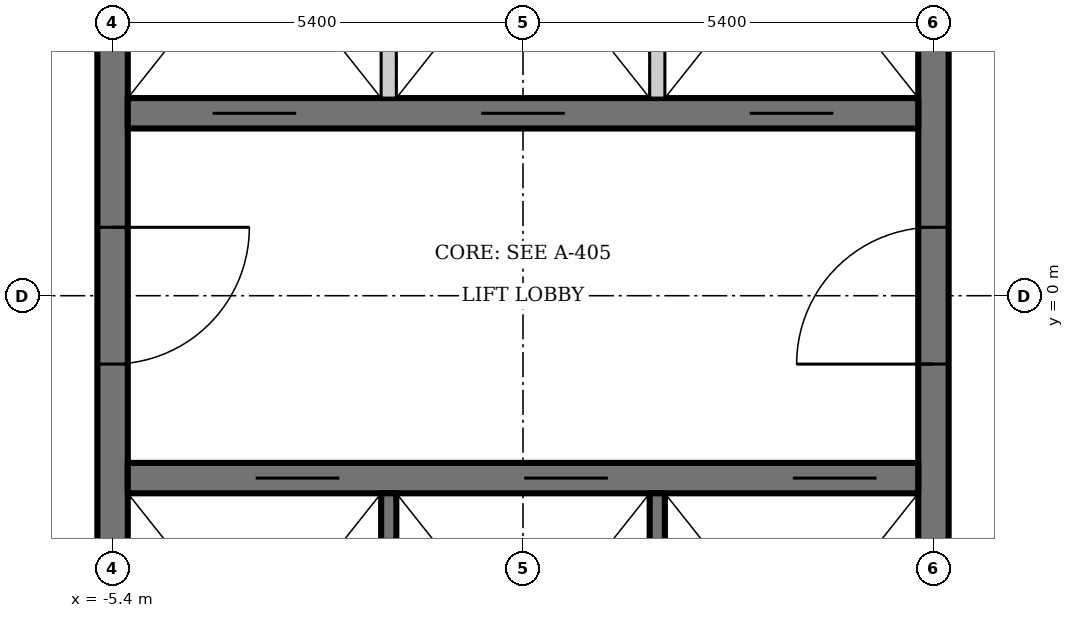
"""IFC4 building model, lengths in metres.
Left out: names, types, materials, properties, quantities, classifications, styles, units other than length and angle.
Written with IfcOpenShell. Run it as: python <this file> out.ifc"""

import sys

from ifc_helpers import new_model, si_unit, direction, frame, frame_2d, origin, place, context, subcontext, project, spatial, rectangle, extrude, element, fill, save


model = new_model("IFC4")
c1 = context("Model", 3, precision=1e-05, world=origin(), true_north=direction((0.0, 1.0)))
c2 = subcontext(c1, "Body", "Model", "MODEL_VIEW")
j1 = project(units=[si_unit("LENGTHUNIT", "METRE"), si_unit("PLANEANGLEUNIT", "RADIAN")], contexts=[c1])
p1 = place(None, origin())
s1 = spatial("IfcSite", under=j1, at=p1, CompositionType="ELEMENT")
p2 = place(p1, origin())
s2 = spatial("IfcBuilding", under=s1, at=p2, CompositionType="ELEMENT")
p3 = place(p2, frame((0.0, 0.0, 111.4)))
s3 = spatial("IfcBuildingStorey", under=s2, at=p3, CompositionType="ELEMENT", Elevation=111.4)
p4 = place(p3, frame((5.4, -6.8, 0.0), z_axis=(0.0, 0.0, 1.0), x_axis=(0.0, 1.0, 0.0)))
e1 = element("IfcWall", 1, at=p4, inside=s3, PredefinedType="SHEAR", context=c2, shape_type="SweptSolid", body=[
    extrude(rectangle(XDim=13.6, YDim=0.4, at=frame_2d((6.8, 0.0))), origin(), (0.0, 0.0, 1.0), 6.0),
])
p5 = place(p4, frame((5.9, 0.0, 0.0)))
e2 = element("IfcOpeningElement", 2, at=p5, cuts=e1, PredefinedType="OPENING", context=c2, shape_type="SweptSolid", body=[
    extrude(rectangle(XDim=1.8, YDim=2.1, at=frame_2d((0.9, 1.05))), frame((0.0, 0.21, 0.0), z_axis=(0.0, -1.0, 0.0), x_axis=(1.0, 0.0, 0.0)), (0.0, 0.0, 1.0), 0.42),
])
p6 = place(p3, frame((-5.4, 6.8, 0.0), z_axis=(0.0, 0.0, 1.0), x_axis=(0.0, -1.0, 0.0)))
e3 = element("IfcWall", 3, at=p6, inside=s3, PredefinedType="SHEAR", context=c2, shape_type="SweptSolid", body=[
    extrude(rectangle(XDim=13.6, YDim=0.4, at=frame_2d((6.8, 0.0))), origin(), (0.0, 0.0, 1.0), 6.0),
])
p7 = place(p6, frame((5.9, 0.0, 0.0)))
e4 = element("IfcOpeningElement", 4, at=p7, cuts=e3, PredefinedType="OPENING", context=c2, shape_type="SweptSolid", body=[
    extrude(rectangle(XDim=1.8, YDim=2.1, at=frame_2d((0.9, 1.05))), frame((0.0, 0.21, 0.0), z_axis=(0.0, -1.0, 0.0), x_axis=(1.0, 0.0, 0.0)), (0.0, 0.0, 1.0), 0.42),
])
p8 = place(p3, frame((-5.2, -2.4, 0.0), z_axis=(0.0, 0.0, 1.0), x_axis=(1.0, 0.0, 0.0)))
e5 = element("IfcWall", 5, at=p8, inside=s3, PredefinedType="SHEAR", context=c2, shape_type="SweptSolid", body=[
    extrude(rectangle(XDim=10.4, YDim=0.4, at=frame_2d((5.2, 0.0))), origin(), (0.0, 0.0, 1.0), 6.0),
])
p9 = place(p8, frame((1.683, 0.0, 0.0)))
e6 = element("IfcOpeningElement", 6, at=p9, cuts=e5, PredefinedType="OPENING", context=c2, shape_type="SweptSolid", body=[
    extrude(rectangle(XDim=1.1, YDim=2.2, at=frame_2d((0.55, 1.1))), frame((0.0, 0.21, 0.0), z_axis=(0.0, -1.0, 0.0), x_axis=(1.0, 0.0, 0.0)), (0.0, 0.0, 1.0), 0.42),
])
p10 = place(p8, frame((5.217, 0.0, 0.0)))
e7 = element("IfcOpeningElement", 7, at=p10, cuts=e5, PredefinedType="OPENING", context=c2, shape_type="SweptSolid", body=[
    extrude(rectangle(XDim=1.1, YDim=2.2, at=frame_2d((0.55, 1.1))), frame((0.0, 0.21, 0.0), z_axis=(0.0, -1.0, 0.0), x_axis=(1.0, 0.0, 0.0)), (0.0, 0.0, 1.0), 0.42),
])
p11 = place(p8, frame((8.75, 0.0, 0.0)))
e8 = element("IfcOpeningElement", 8, at=p11, cuts=e5, PredefinedType="OPENING", context=c2, shape_type="SweptSolid", body=[
    extrude(rectangle(XDim=1.1, YDim=2.2, at=frame_2d((0.55, 1.1))), frame((0.0, 0.21, 0.0), z_axis=(0.0, -1.0, 0.0), x_axis=(1.0, 0.0, 0.0)), (0.0, 0.0, 1.0), 0.42),
])
for number, where, z_axis, x_axis in (
    (9, (-1.767, -2.6, 0.0), (0.0, 0.0, 1.0), (0.0, -1.0, 0.0)),
    (10, (1.767, -2.6, 0.0), (0.0, 0.0, 1.0), (0.0, -1.0, 0.0)),
):
    element("IfcWall", number, at=place(p3, frame(where, z_axis=z_axis, x_axis=x_axis)), inside=s3, PredefinedType="SOLIDWALL", context=c2, shape_type="SweptSolid", body=[
        extrude(rectangle(XDim=4.2, YDim=0.2, at=frame_2d((2.1, 0.0))), origin(), (0.0, 0.0, 1.0), 6.0),
    ])
p12 = place(p3, frame((5.2, 2.4, 0.0), z_axis=(0.0, 0.0, 1.0), x_axis=(-1.0, 0.0, 0.0)))
e11 = element("IfcWall", 11, at=p12, inside=s3, PredefinedType="SHEAR", context=c2, shape_type="SweptSolid", body=[
    extrude(rectangle(XDim=10.4, YDim=0.4, at=frame_2d((5.2, 0.0))), origin(), (0.0, 0.0, 1.0), 6.0),
])
p13 = place(p12, frame((8.183, 0.0, 0.0)))
e12 = element("IfcOpeningElement", 12, at=p13, cuts=e11, PredefinedType="OPENING", context=c2, shape_type="SweptSolid", body=[
    extrude(rectangle(XDim=1.1, YDim=2.2, at=frame_2d((0.55, 1.1))), frame((0.0, 0.21, 0.0), z_axis=(0.0, -1.0, 0.0), x_axis=(1.0, 0.0, 0.0)), (0.0, 0.0, 1.0), 0.42),
])
p14 = place(p12, frame((4.65, 0.0, 0.0)))
e13 = element("IfcOpeningElement", 13, at=p14, cuts=e11, PredefinedType="OPENING", context=c2, shape_type="SweptSolid", body=[
    extrude(rectangle(XDim=1.1, YDim=2.2, at=frame_2d((0.55, 1.1))), frame((0.0, 0.21, 0.0), z_axis=(0.0, -1.0, 0.0), x_axis=(1.0, 0.0, 0.0)), (0.0, 0.0, 1.0), 0.42),
])
p15 = place(p12, frame((1.117, 0.0, 0.0)))
e14 = element("IfcOpeningElement", 14, at=p15, cuts=e11, PredefinedType="OPENING", context=c2, shape_type="SweptSolid", body=[
    extrude(rectangle(XDim=1.1, YDim=2.2, at=frame_2d((0.55, 1.1))), frame((0.0, 0.21, 0.0), z_axis=(0.0, -1.0, 0.0), x_axis=(1.0, 0.0, 0.0)), (0.0, 0.0, 1.0), 0.42),
])
for number, where, z_axis, x_axis in (
    (15, (-1.767, 2.6, 0.0), (0.0, 0.0, 1.0), (0.0, 1.0, 0.0)),
    (16, (1.767, 2.6, 0.0), (0.0, 0.0, 1.0), (0.0, 1.0, 0.0)),
):
    element("IfcWall", number, at=place(p3, frame(where, z_axis=z_axis, x_axis=x_axis)), inside=s3, PredefinedType="SOLIDWALL", context=c2, shape_type="SweptSolid", body=[
        extrude(rectangle(XDim=4.2, YDim=0.2, at=frame_2d((2.1, 0.0))), origin(), (0.0, 0.0, 1.0), 6.0),
    ])
p16 = place(p5, origin())
e17 = element("IfcDoor", 17, at=p16, inside=s3, OperationType="DOUBLE_DOOR_DOUBLE_SWING", PredefinedType="DOOR", context=c2, shape_type="SweptSolid", body=[
    extrude(rectangle(XDim=1.8, YDim=2.1, at=frame_2d((0.9, 1.05))), frame((0.0, 0.025, 0.0), z_axis=(0.0, -1.0, 0.0), x_axis=(1.0, 0.0, 0.0)), (0.0, 0.0, 1.0), 0.05),
])
fill(e2, e17)
p17 = place(p7, origin())
e18 = element("IfcDoor", 18, at=p17, inside=s3, OperationType="DOUBLE_DOOR_DOUBLE_SWING", PredefinedType="DOOR", context=c2, shape_type="SweptSolid", body=[
    extrude(rectangle(XDim=1.8, YDim=2.1, at=frame_2d((0.9, 1.05))), frame((0.0, 0.025, 0.0), z_axis=(0.0, -1.0, 0.0), x_axis=(1.0, 0.0, 0.0)), (0.0, 0.0, 1.0), 0.05),
])
fill(e4, e18)
p18 = place(p13, origin())
e19 = element("IfcDoor", 19, at=p18, inside=s3, OperationType="DOUBLE_DOOR_SLIDING", PredefinedType="DOOR", context=c2, shape_type="SweptSolid", body=[
    extrude(rectangle(XDim=1.1, YDim=2.2, at=frame_2d((0.55, 1.1))), frame((0.0, 0.025, 0.0), z_axis=(0.0, -1.0, 0.0), x_axis=(1.0, 0.0, 0.0)), (0.0, 0.0, 1.0), 0.05),
])
fill(e12, e19)
p19 = place(p9, origin())
e20 = element("IfcDoor", 20, at=p19, inside=s3, OperationType="DOUBLE_DOOR_SLIDING", PredefinedType="DOOR", context=c2, shape_type="SweptSolid", body=[
    extrude(rectangle(XDim=1.1, YDim=2.2, at=frame_2d((0.55, 1.1))), frame((0.0, 0.025, 0.0), z_axis=(0.0, -1.0, 0.0), x_axis=(1.0, 0.0, 0.0)), (0.0, 0.0, 1.0), 0.05),
])
fill(e6, e20)
p20 = place(p14, origin())
e21 = element("IfcDoor", 21, at=p20, inside=s3, OperationType="DOUBLE_DOOR_SLIDING", PredefinedType="DOOR", context=c2, shape_type="SweptSolid", body=[
    extrude(rectangle(XDim=1.1, YDim=2.2, at=frame_2d((0.55, 1.1))), frame((0.0, 0.025, 0.0), z_axis=(0.0, -1.0, 0.0), x_axis=(1.0, 0.0, 0.0)), (0.0, 0.0, 1.0), 0.05),
])
fill(e13, e21)
p21 = place(p10, origin())
e22 = element("IfcDoor", 22, at=p21, inside=s3, OperationType="DOUBLE_DOOR_SLIDING", PredefinedType="DOOR", context=c2, shape_type="SweptSolid", body=[
    extrude(rectangle(XDim=1.1, YDim=2.2, at=frame_2d((0.55, 1.1))), frame((0.0, 0.025, 0.0), z_axis=(0.0, -1.0, 0.0), x_axis=(1.0, 0.0, 0.0)), (0.0, 0.0, 1.0), 0.05),
])
fill(e7, e22)
p22 = place(p15, origin())
e23 = element("IfcDoor", 23, at=p22, inside=s3, OperationType="DOUBLE_DOOR_SLIDING", PredefinedType="DOOR", context=c2, shape_type="SweptSolid", body=[
    extrude(rectangle(XDim=1.1, YDim=2.2, at=frame_2d((0.55, 1.1))), frame((0.0, 0.025, 0.0), z_axis=(0.0, -1.0, 0.0), x_axis=(1.0, 0.0, 0.0)), (0.0, 0.0, 1.0), 0.05),
])
fill(e14, e23)
p23 = place(p11, origin())
e24 = element("IfcDoor", 24, at=p23, inside=s3, OperationType="DOUBLE_DOOR_SLIDING", PredefinedType="DOOR", context=c2, shape_type="SweptSolid", body=[
    extrude(rectangle(XDim=1.1, YDim=2.2, at=frame_2d((0.55, 1.1))), frame((0.0, 0.025, 0.0), z_axis=(0.0, -1.0, 0.0), x_axis=(1.0, 0.0, 0.0)), (0.0, 0.0, 1.0), 0.05),
])
fill(e8, e24)
save(model, sys.argv[1])
